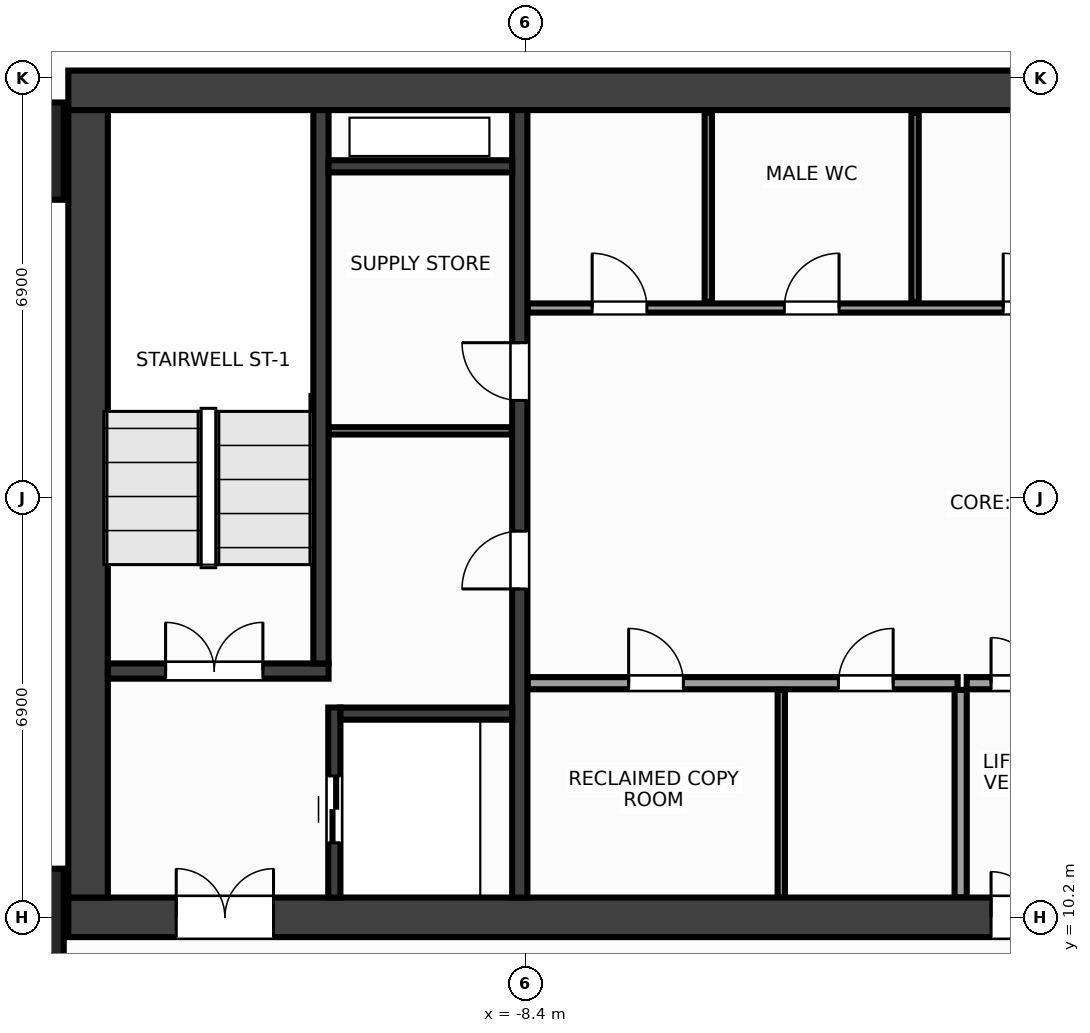
"""IFC4 building model, lengths in metres.
Left out: names, types, materials, properties, quantities, classifications, styles, units other than length and angle.
Written with IfcOpenShell. Run it as: python <this file> out.ifc"""

import sys

from ifc_helpers import new_model, si_unit, direction, frame, frame_2d, origin, origin_2d, place, context, subcontext, project, spatial, rectangle, extrude, source, transform, mapped, element, fill, save


model = new_model("IFC4")
c1 = context("Model", 3, precision=1e-05, world=origin(), true_north=direction((0.0, 1.0)))
c2 = subcontext(c1, "Body", "Model", "MODEL_VIEW")
j1 = project(units=[si_unit("LENGTHUNIT", "METRE"), si_unit("PLANEANGLEUNIT", "RADIAN")], contexts=[c1])
p1 = place(None, origin())
s1 = spatial("IfcSite", under=j1, at=p1, CompositionType="ELEMENT")
p2 = place(p1, origin())
s2 = spatial("IfcBuilding", under=s1, at=p2, CompositionType="ELEMENT")
p3 = place(p2, frame((0.0, 0.0, 117.2)))
s3 = spatial("IfcBuildingStorey", under=s2, at=p3, CompositionType="ELEMENT", Elevation=117.2)
m1 = source(origin(), c2, "Body", "SweptSolid", [
    extrude(rectangle(XDim=31.85, YDim=0.65, at=frame_2d((15.925, 0.0))), origin(), (0.0, 0.0, 1.0), 3.6),
])
p4 = place(p3, frame((-15.925, 23.8, 0.0), z_axis=(0.0, 0.0, 1.0), x_axis=(1.0, 0.0, 0.0)))
e1 = element("IfcWall", 1, at=p4, inside=s3, PredefinedType="SHEAR", context=c2, shape_type="MappedRepresentation", body=[
    mapped(m1, transform((0.0, 0.0, 0.0), x_axis=(1.0, 0.0, 0.0), y_axis=(0.0, 1.0, 0.0), z_axis=(0.0, 0.0, 1.0), scale=1.0)),
])
p5 = place(p3, frame((-15.925, 10.2, 0.0), z_axis=(0.0, 0.0, 1.0), x_axis=(1.0, 0.0, 0.0)))
e2 = element("IfcWall", 2, at=p5, inside=s3, PredefinedType="SHEAR", context=c2, shape_type="MappedRepresentation", body=[
    mapped(m1, transform((0.0, 0.0, 0.0), x_axis=(1.0, 0.0, 0.0), y_axis=(0.0, 1.0, 0.0), z_axis=(0.0, 0.0, 1.0), scale=1.0)),
])
p6 = place(p5, frame((1.775, 0.0, 0.0)))
e3 = element("IfcOpeningElement", 3, at=p6, cuts=e2, PredefinedType="OPENING", context=c2, shape_type="SweptSolid", body=[
    extrude(rectangle(XDim=1.6, YDim=2.15, at=frame_2d((0.8, 1.075))), frame((0.0, 0.337, 0.0), z_axis=(0.0, -1.0, 0.0), x_axis=(1.0, 0.0, 0.0)), (0.0, 0.0, 1.0), 0.674),
])
p7 = place(p5, frame((28.475, 0.0, 0.0)))
e4 = element("IfcOpeningElement", 4, at=p7, cuts=e2, PredefinedType="OPENING", context=c2, shape_type="SweptSolid", body=[
    extrude(rectangle(XDim=1.6, YDim=2.15, at=frame_2d((0.8, 1.075))), frame((0.0, 0.337, 0.0), z_axis=(0.0, -1.0, 0.0), x_axis=(1.0, 0.0, 0.0)), (0.0, 0.0, 1.0), 0.674),
])
p8 = place(p5, frame((15.175, 0.0, 0.0)))
e5 = element("IfcOpeningElement", 5, at=p8, cuts=e2, PredefinedType="OPENING", context=c2, shape_type="SweptSolid", body=[
    extrude(rectangle(XDim=1.5, YDim=2.2, at=frame_2d((0.75, 1.1))), frame((0.0, 0.337, 0.0), z_axis=(0.0, -1.0, 0.0), x_axis=(1.0, 0.0, 0.0)), (0.0, 0.0, 1.0), 0.674),
])
m2 = source(origin(), c2, "Body", "SweptSolid", [
    extrude(rectangle(XDim=12.95, YDim=0.65, at=frame_2d((6.475, 0.0))), origin(), (0.0, 0.0, 1.0), 3.6),
])
p9 = place(p3, frame((-15.6, 10.525, 0.0), z_axis=(0.0, 0.0, 1.0), x_axis=(0.0, 1.0, 0.0)))
e6 = element("IfcWall", 6, at=p9, inside=s3, PredefinedType="SHEAR", context=c2, shape_type="MappedRepresentation", body=[
    mapped(m2, transform((0.0, 0.0, 0.0), x_axis=(1.0, 0.0, 0.0), y_axis=(0.0, 1.0, 0.0), z_axis=(0.0, 0.0, 1.0), scale=1.0)),
])
m3 = source(origin(), c2, "Body", "SweptSolid", [
    extrude(rectangle(XDim=12.95, YDim=0.25, at=frame_2d((6.475, 0.0))), origin(), (0.0, 0.0, 1.0), 3.6),
])
p10 = place(p3, frame((-8.5, 10.525, 0.0), z_axis=(0.0, 0.0, 1.0), x_axis=(0.0, 1.0, 0.0)))
e7 = element("IfcWall", 7, at=p10, inside=s3, PredefinedType="SHEAR", context=c2, shape_type="MappedRepresentation", body=[
    mapped(m3, transform((0.0, 0.0, 0.0), x_axis=(1.0, 0.0, 0.0), y_axis=(0.0, 1.0, 0.0), z_axis=(0.0, 0.0, 1.0), scale=1.0)),
])
p11 = place(p10, frame((5.075, 0.0, 0.0)))
e8 = element("IfcOpeningElement", 8, at=p11, cuts=e7, PredefinedType="OPENING", context=c2, shape_type="SweptSolid", body=[
    extrude(rectangle(XDim=0.95, YDim=2.15, at=frame_2d((0.475, 1.075))), frame((0.0, 0.137, 0.0), z_axis=(0.0, -1.0, 0.0), x_axis=(1.0, 0.0, 0.0)), (0.0, 0.0, 1.0), 0.274),
])
p12 = place(p10, frame((8.175, 0.0, 0.0)))
e9 = element("IfcOpeningElement", 9, at=p12, cuts=e7, PredefinedType="OPENING", context=c2, shape_type="SweptSolid", body=[
    extrude(rectangle(XDim=0.95, YDim=2.15, at=frame_2d((0.475, 1.075))), frame((0.0, 0.137, 0.0), z_axis=(0.0, -1.0, 0.0), x_axis=(1.0, 0.0, 0.0)), (0.0, 0.0, 1.0), 0.274),
])
m4 = source(origin(), c2, "Body", "SweptSolid", [
    extrude(rectangle(XDim=3.63, YDim=0.25, at=frame_2d((1.815, 0.0))), origin(), (0.0, 0.0, 1.0), 3.6),
])
p13 = place(p3, frame((-15.275, 14.25, 0.0), z_axis=(0.0, 0.0, 1.0), x_axis=(1.0, 0.0, 0.0)))
e10 = element("IfcWall", 10, at=p13, inside=s3, PredefinedType="SHEAR", context=c2, shape_type="MappedRepresentation", body=[
    mapped(m4, transform((0.0, 0.0, 0.0), x_axis=(1.0, 0.0, 0.0), y_axis=(0.0, 1.0, 0.0), z_axis=(0.0, 0.0, 1.0), scale=1.0)),
])
p14 = place(p13, frame((0.95, 0.0, 0.0)))
e11 = element("IfcOpeningElement", 11, at=p14, cuts=e10, PredefinedType="OPENING", context=c2, shape_type="SweptSolid", body=[
    extrude(rectangle(XDim=1.6, YDim=2.15, at=frame_2d((0.8, 1.075))), frame((0.0, 0.137, 0.0), z_axis=(0.0, -1.0, 0.0), x_axis=(1.0, 0.0, 0.0)), (0.0, 0.0, 1.0), 0.274),
])
m5 = source(origin(), c2, "Body", "SweptSolid", [
    extrude(rectangle(XDim=9.1, YDim=0.25, at=frame_2d((4.55, 0.0))), origin(), (0.0, 0.0, 1.0), 3.6),
])
p15 = place(p3, frame((-11.77, 14.375, 0.0), z_axis=(0.0, 0.0, 1.0), x_axis=(0.0, 1.0, 0.0)))
e12 = element("IfcWall", 12, at=p15, inside=s3, PredefinedType="SHEAR", context=c2, shape_type="MappedRepresentation", body=[
    mapped(m5, transform((0.0, 0.0, 0.0), x_axis=(1.0, 0.0, 0.0), y_axis=(0.0, 1.0, 0.0), z_axis=(0.0, 0.0, 1.0), scale=1.0)),
])
m6 = source(origin(), c2, "Body", "SweptSolid", [
    extrude(rectangle(XDim=3.125, YDim=0.2, at=frame_2d((1.562, 0.0))), origin(), (0.0, 0.0, 1.0), 3.6),
])
p16 = place(p3, frame((-11.55, 10.525, 0.0), z_axis=(0.0, 0.0, 1.0), x_axis=(0.0, 1.0, 0.0)))
e13 = element("IfcWall", 13, at=p16, inside=s3, PredefinedType="SHEAR", context=c2, shape_type="MappedRepresentation", body=[
    mapped(m6, transform((0.0, 0.0, 0.0), x_axis=(1.0, 0.0, 0.0), y_axis=(0.0, 1.0, 0.0), z_axis=(0.0, 0.0, 1.0), scale=1.0)),
])
p17 = place(p16, frame((0.9, 0.0, 0.0)))
e14 = element("IfcOpeningElement", 14, at=p17, cuts=e13, PredefinedType="OPENING", context=c2, shape_type="SweptSolid", body=[
    extrude(rectangle(XDim=1.1, YDim=2.15, at=frame_2d((0.55, 1.075))), frame((0.0, 0.112, 0.0), z_axis=(0.0, -1.0, 0.0), x_axis=(1.0, 0.0, 0.0)), (0.0, 0.0, 1.0), 0.224),
])
m7 = source(origin(), c2, "Body", "SweptSolid", [
    extrude(rectangle(XDim=2.825, YDim=0.2, at=frame_2d((1.413, 0.0))), origin(), (0.0, 0.0, 1.0), 3.6),
])
p18 = place(p3, frame((-11.45, 13.55, 0.0), z_axis=(0.0, 0.0, 1.0), x_axis=(1.0, 0.0, 0.0)))
e15 = element("IfcWall", 15, at=p18, inside=s3, PredefinedType="SHEAR", context=c2, shape_type="MappedRepresentation", body=[
    mapped(m7, transform((0.0, 0.0, 0.0), x_axis=(1.0, 0.0, 0.0), y_axis=(0.0, 1.0, 0.0), z_axis=(0.0, 0.0, 1.0), scale=1.0)),
])
m8 = source(origin(), c2, "Body", "SweptSolid", [
    extrude(rectangle(XDim=3.02, YDim=0.2, at=frame_2d((1.51, 0.0))), origin(), (0.0, 0.0, 1.0), 3.6),
])
p19 = place(p3, frame((-11.645, 22.55, 0.0), z_axis=(0.0, 0.0, 1.0), x_axis=(1.0, 0.0, 0.0)))
e16 = element("IfcWall", 16, at=p19, inside=s3, PredefinedType="SHEAR", context=c2, shape_type="MappedRepresentation", body=[
    mapped(m8, transform((0.0, 0.0, 0.0), x_axis=(1.0, 0.0, 0.0), y_axis=(0.0, 1.0, 0.0), z_axis=(0.0, 0.0, 1.0), scale=1.0)),
])
m9 = source(origin(), c2, "Body", "SweptSolid", [
    extrude(rectangle(XDim=1.6, YDim=1.6, at=origin_2d()), origin(), (0.0, 0.0, 1.0), 3.6),
])
for number, where, z_axis, x_axis in (
    (17, (-16.8, 10.2, 0.0), (0.0, 0.0, 1.0), (1.0, 0.0, 0.0)),
    (18, (-16.8, 22.8, 0.0), (0.0, 0.0, 1.0), (1.0, 0.0, 0.0)),
):
    element("IfcColumn", number, at=place(p3, frame(where, z_axis=z_axis, x_axis=x_axis)), inside=s3, PredefinedType="COLUMN", context=c2, shape_type="MappedRepresentation", body=[
        mapped(m9, transform((0.0, 0.0, 0.0), x_axis=(1.0, 0.0, 0.0), y_axis=(0.0, 1.0, 0.0), z_axis=(0.0, 0.0, 1.0), scale=1.0)),
    ])
m10 = source(origin(), c2, "Body", "SweptSolid", [
    extrude(rectangle(XDim=3.01, YDim=0.12, at=frame_2d((1.505, 0.0))), origin(), (0.0, 0.0, 1.0), 3.36),
])
p20 = place(p3, frame((-11.64, 18.2, 0.0), z_axis=(0.0, 0.0, 1.0), x_axis=(1.0, 0.0, 0.0)))
e19 = element("IfcWall", 19, at=p20, inside=s3, PredefinedType="PARTITIONING", context=c2, shape_type="MappedRepresentation", body=[
    mapped(m10, transform((0.0, 0.0, 0.0), x_axis=(1.0, 0.0, 0.0), y_axis=(0.0, 1.0, 0.0), z_axis=(0.0, 0.0, 1.0), scale=1.0)),
])
m11 = source(origin(), c2, "Body", "SweptSolid", [
    extrude(rectangle(XDim=7.07, YDim=0.2, at=frame_2d((3.535, 0.0))), origin(), (0.0, 0.0, 1.0), 3.36),
])
p21 = place(p3, frame((-8.37, 14.05, 0.0), z_axis=(0.0, 0.0, 1.0), x_axis=(1.0, 0.0, 0.0)))
e20 = element("IfcWall", 20, at=p21, inside=s3, PredefinedType="PARTITIONING", context=c2, shape_type="MappedRepresentation", body=[
    mapped(m11, transform((0.0, 0.0, 0.0), x_axis=(1.0, 0.0, 0.0), y_axis=(0.0, 1.0, 0.0), z_axis=(0.0, 0.0, 1.0), scale=1.0)),
])
p22 = place(p21, frame((1.66, 0.0, 0.0)))
e21 = element("IfcOpeningElement", 21, at=p22, cuts=e20, PredefinedType="OPENING", context=c2, shape_type="SweptSolid", body=[
    extrude(rectangle(XDim=0.9, YDim=2.15, at=frame_2d((0.45, 1.075))), frame((0.0, 0.112, 0.0), z_axis=(0.0, -1.0, 0.0), x_axis=(1.0, 0.0, 0.0)), (0.0, 0.0, 1.0), 0.224),
])
p23 = place(p21, frame((5.11, 0.0, 0.0)))
e22 = element("IfcOpeningElement", 22, at=p23, cuts=e20, PredefinedType="OPENING", context=c2, shape_type="SweptSolid", body=[
    extrude(rectangle(XDim=0.9, YDim=2.15, at=frame_2d((0.45, 1.075))), frame((0.0, 0.112, 0.0), z_axis=(0.0, -1.0, 0.0), x_axis=(1.0, 0.0, 0.0)), (0.0, 0.0, 1.0), 0.224),
])
m12 = source(origin(), c2, "Body", "SweptSolid", [
    extrude(rectangle(XDim=3.415, YDim=0.2, at=frame_2d((1.708, 0.0))), origin(), (0.0, 0.0, 1.0), 3.36),
])
p24 = place(p3, frame((-1.25, 10.525, 0.0), z_axis=(0.0, 0.0, 1.0), x_axis=(0.0, 1.0, 0.0)))
e23 = element("IfcWall", 23, at=p24, inside=s3, PredefinedType="PARTITIONING", context=c2, shape_type="MappedRepresentation", body=[
    mapped(m12, transform((0.0, 0.0, 0.0), x_axis=(1.0, 0.0, 0.0), y_axis=(0.0, 1.0, 0.0), z_axis=(0.0, 0.0, 1.0), scale=1.0)),
])
m13 = source(origin(), c2, "Body", "SweptSolid", [
    extrude(rectangle(XDim=2.3, YDim=0.2, at=frame_2d((1.15, 0.0))), origin(), (0.0, 0.0, 1.0), 3.36),
])
p25 = place(p3, frame((-1.15, 14.05, 0.0), z_axis=(0.0, 0.0, 1.0), x_axis=(1.0, 0.0, 0.0)))
e24 = element("IfcWall", 24, at=p25, inside=s3, PredefinedType="PARTITIONING", context=c2, shape_type="MappedRepresentation", body=[
    mapped(m13, transform((0.0, 0.0, 0.0), x_axis=(1.0, 0.0, 0.0), y_axis=(0.0, 1.0, 0.0), z_axis=(0.0, 0.0, 1.0), scale=1.0)),
])
p26 = place(p25, frame((0.4, 0.0, 0.0)))
e25 = element("IfcOpeningElement", 25, at=p26, cuts=e24, PredefinedType="OPENING", context=c2, shape_type="SweptSolid", body=[
    extrude(rectangle(XDim=1.5, YDim=2.2, at=frame_2d((0.75, 1.1))), frame((0.0, 0.112, 0.0), z_axis=(0.0, -1.0, 0.0), x_axis=(1.0, 0.0, 0.0)), (0.0, 0.0, 1.0), 0.224),
])
m14 = source(origin(), c2, "Body", "SweptSolid", [
    extrude(rectangle(XDim=14.59, YDim=0.15, at=frame_2d((7.295, 0.0))), origin(), (0.0, 0.0, 1.0), 3.36),
])
p27 = place(p3, frame((-8.37, 20.22, 0.0), z_axis=(0.0, 0.0, 1.0), x_axis=(1.0, 0.0, 0.0)))
e26 = element("IfcWall", 26, at=p27, inside=s3, PredefinedType="PARTITIONING", context=c2, shape_type="MappedRepresentation", body=[
    mapped(m14, transform((0.0, 0.0, 0.0), x_axis=(1.0, 0.0, 0.0), y_axis=(0.0, 1.0, 0.0), z_axis=(0.0, 0.0, 1.0), scale=1.0)),
])
p28 = place(p27, frame((1.06, 0.0, 0.0)))
e27 = element("IfcOpeningElement", 27, at=p28, cuts=e26, PredefinedType="OPENING", context=c2, shape_type="SweptSolid", body=[
    extrude(rectangle(XDim=0.9, YDim=2.15, at=frame_2d((0.45, 1.075))), frame((0.0, 0.087, 0.0), z_axis=(0.0, -1.0, 0.0), x_axis=(1.0, 0.0, 0.0)), (0.0, 0.0, 1.0), 0.174),
])
p29 = place(p27, frame((4.22, 0.0, 0.0)))
e28 = element("IfcOpeningElement", 28, at=p29, cuts=e26, PredefinedType="OPENING", context=c2, shape_type="SweptSolid", body=[
    extrude(rectangle(XDim=0.9, YDim=2.15, at=frame_2d((0.45, 1.075))), frame((0.0, 0.087, 0.0), z_axis=(0.0, -1.0, 0.0), x_axis=(1.0, 0.0, 0.0)), (0.0, 0.0, 1.0), 0.174),
])
p30 = place(p27, frame((7.82, 0.0, 0.0)))
e29 = element("IfcOpeningElement", 29, at=p30, cuts=e26, PredefinedType="OPENING", context=c2, shape_type="SweptSolid", body=[
    extrude(rectangle(XDim=0.9, YDim=2.15, at=frame_2d((0.45, 1.075))), frame((0.0, 0.087, 0.0), z_axis=(0.0, -1.0, 0.0), x_axis=(1.0, 0.0, 0.0)), (0.0, 0.0, 1.0), 0.174),
])
p31 = place(p27, frame((11.87, 0.0, 0.0)))
e30 = element("IfcOpeningElement", 30, at=p31, cuts=e26, PredefinedType="OPENING", context=c2, shape_type="SweptSolid", body=[
    extrude(rectangle(XDim=0.9, YDim=2.15, at=frame_2d((0.45, 1.075))), frame((0.0, 0.087, 0.0), z_axis=(0.0, -1.0, 0.0), x_axis=(1.0, 0.0, 0.0)), (0.0, 0.0, 1.0), 0.174),
])
m15 = source(origin(), c2, "Body", "SweptSolid", [
    extrude(rectangle(XDim=3.415, YDim=0.12, at=frame_2d((1.708, 0.0))), origin(), (0.0, 0.0, 1.0), 3.36),
])
p32 = place(p3, frame((-4.2, 10.525, 0.0), z_axis=(0.0, 0.0, 1.0), x_axis=(0.0, 1.0, 0.0)))
e31 = element("IfcWall", 31, at=p32, inside=s3, PredefinedType="PARTITIONING", context=c2, shape_type="MappedRepresentation", body=[
    mapped(m15, transform((0.0, 0.0, 0.0), x_axis=(1.0, 0.0, 0.0), y_axis=(0.0, 1.0, 0.0), z_axis=(0.0, 0.0, 1.0), scale=1.0)),
])
m16 = source(origin(), c2, "Body", "SweptSolid", [
    extrude(rectangle(XDim=3.115, YDim=0.12, at=frame_2d((1.558, 0.0))), origin(), (0.0, 0.0, 1.0), 3.36),
])
for number, where, z_axis, x_axis in (
    (32, (-5.4, 20.32, 0.0), (0.0, 0.0, 1.0), (0.0, 1.0, 0.0)),
    (33, (-2.0, 20.32, 0.0), (0.0, 0.0, 1.0), (0.0, 1.0, 0.0)),
):
    element("IfcWall", number, at=place(p3, frame(where, z_axis=z_axis, x_axis=x_axis)), inside=s3, PredefinedType="PARTITIONING", context=c2, shape_type="MappedRepresentation", body=[
        mapped(m16, transform((0.0, 0.0, 0.0), x_axis=(1.0, 0.0, 0.0), y_axis=(0.0, 1.0, 0.0), z_axis=(0.0, 0.0, 1.0), scale=1.0)),
    ])
m17 = source(origin(), c2, "Body", "SweptSolid", [
    extrude(rectangle(XDim=1.6, YDim=2.15, at=frame_2d((0.8, 1.075))), frame((0.0, 0.025, 0.0), z_axis=(0.0, -1.0, 0.0), x_axis=(1.0, 0.0, 0.0)), (0.0, 0.0, 1.0), 0.05),
])
p33 = place(p14, origin())
e34 = element("IfcDoor", 34, at=p33, inside=s3, OperationType="DOUBLE_DOOR_SINGLE_SWING", PredefinedType="DOOR", context=c2, shape_type="MappedRepresentation", body=[
    mapped(m17, transform((0.0, 0.0, 0.0), x_axis=(1.0, 0.0, 0.0), y_axis=(0.0, 1.0, 0.0), z_axis=(0.0, 0.0, 1.0), scale=1.0)),
])
fill(e11, e34)
p34 = place(p6, origin())
e35 = element("IfcDoor", 35, at=p34, inside=s3, OperationType="DOUBLE_DOOR_SINGLE_SWING", PredefinedType="DOOR", context=c2, shape_type="MappedRepresentation", body=[
    mapped(m17, transform((0.0, 0.0, 0.0), x_axis=(1.0, 0.0, 0.0), y_axis=(0.0, 1.0, 0.0), z_axis=(0.0, 0.0, 1.0), scale=1.0)),
])
fill(e3, e35)
m18 = source(origin(), c2, "Body", "SweptSolid", [
    extrude(rectangle(XDim=1.1, YDim=2.15, at=frame_2d((0.55, 1.075))), frame((0.0, 0.025, 0.0), z_axis=(0.0, -1.0, 0.0), x_axis=(1.0, 0.0, 0.0)), (0.0, 0.0, 1.0), 0.05),
])
p35 = place(p17, origin())
e36 = element("IfcDoor", 36, at=p35, inside=s3, OperationType="DOUBLE_DOOR_SLIDING", PredefinedType="DOOR", context=c2, shape_type="MappedRepresentation", body=[
    mapped(m18, transform((0.0, 0.0, 0.0), x_axis=(1.0, 0.0, 0.0), y_axis=(0.0, 1.0, 0.0), z_axis=(0.0, 0.0, 1.0), scale=1.0)),
])
fill(e14, e36)
m19 = source(origin(), c2, "Body", "SweptSolid", [
    extrude(rectangle(XDim=0.95, YDim=2.15, at=frame_2d((0.475, 1.075))), frame((0.0, 0.025, 0.0), z_axis=(0.0, -1.0, 0.0), x_axis=(1.0, 0.0, 0.0)), (0.0, 0.0, 1.0), 0.05),
])
p36 = place(p11, origin())
e37 = element("IfcDoor", 37, at=p36, inside=s3, OperationType="SINGLE_SWING_LEFT", PredefinedType="DOOR", context=c2, shape_type="MappedRepresentation", body=[
    mapped(m19, transform((0.0, 0.0, 0.0), x_axis=(1.0, 0.0, 0.0), y_axis=(0.0, 1.0, 0.0), z_axis=(0.0, 0.0, 1.0), scale=1.0)),
])
fill(e8, e37)
p37 = place(p12, origin())
e38 = element("IfcDoor", 38, at=p37, inside=s3, OperationType="SINGLE_SWING_RIGHT", PredefinedType="DOOR", context=c2, shape_type="MappedRepresentation", body=[
    mapped(m19, transform((0.0, 0.0, 0.0), x_axis=(1.0, 0.0, 0.0), y_axis=(0.0, 1.0, 0.0), z_axis=(0.0, 0.0, 1.0), scale=1.0)),
])
fill(e9, e38)
m20 = source(origin(), c2, "Body", "SweptSolid", [
    extrude(rectangle(XDim=0.9, YDim=2.15, at=frame_2d((0.45, 1.075))), frame((0.0, 0.025, 0.0), z_axis=(0.0, -1.0, 0.0), x_axis=(1.0, 0.0, 0.0)), (0.0, 0.0, 1.0), 0.05),
])
p38 = place(p22, origin())
e39 = element("IfcDoor", 39, at=p38, inside=s3, OperationType="SINGLE_SWING_LEFT", PredefinedType="DOOR", context=c2, shape_type="MappedRepresentation", body=[
    mapped(m20, transform((0.0, 0.0, 0.0), x_axis=(1.0, 0.0, 0.0), y_axis=(0.0, 1.0, 0.0), z_axis=(0.0, 0.0, 1.0), scale=1.0)),
])
fill(e21, e39)
p39 = place(p23, origin())
e40 = element("IfcDoor", 40, at=p39, inside=s3, OperationType="SINGLE_SWING_RIGHT", PredefinedType="DOOR", context=c2, shape_type="MappedRepresentation", body=[
    mapped(m20, transform((0.0, 0.0, 0.0), x_axis=(1.0, 0.0, 0.0), y_axis=(0.0, 1.0, 0.0), z_axis=(0.0, 0.0, 1.0), scale=1.0)),
])
fill(e22, e40)
m21 = source(origin(), c2, "Body", "SweptSolid", [
    extrude(rectangle(XDim=1.5, YDim=2.2, at=frame_2d((0.75, 1.1))), frame((0.0, 0.025, 0.0), z_axis=(0.0, -1.0, 0.0), x_axis=(1.0, 0.0, 0.0)), (0.0, 0.0, 1.0), 0.05),
])
p40 = place(p26, origin())
e41 = element("IfcDoor", 41, at=p40, inside=s3, OperationType="DOUBLE_DOOR_SINGLE_SWING", PredefinedType="DOOR", context=c2, shape_type="MappedRepresentation", body=[
    mapped(m21, transform((0.0, 0.0, 0.0), x_axis=(1.0, 0.0, 0.0), y_axis=(0.0, 1.0, 0.0), z_axis=(0.0, 0.0, 1.0), scale=1.0)),
])
fill(e25, e41)
p41 = place(p8, origin())
e42 = element("IfcDoor", 42, at=p41, inside=s3, OperationType="DOUBLE_DOOR_SINGLE_SWING", PredefinedType="DOOR", context=c2, shape_type="MappedRepresentation", body=[
    mapped(m21, transform((0.0, 0.0, 0.0), x_axis=(1.0, 0.0, 0.0), y_axis=(0.0, 1.0, 0.0), z_axis=(0.0, 0.0, 1.0), scale=1.0)),
])
fill(e5, e42)
p42 = place(p28, origin())
e43 = element("IfcDoor", 43, at=p42, inside=s3, OperationType="SINGLE_SWING_LEFT", PredefinedType="DOOR", context=c2, shape_type="MappedRepresentation", body=[
    mapped(m20, transform((0.0, 0.0, 0.0), x_axis=(1.0, 0.0, 0.0), y_axis=(0.0, 1.0, 0.0), z_axis=(0.0, 0.0, 1.0), scale=1.0)),
])
fill(e27, e43)
p43 = place(p29, origin())
e44 = element("IfcDoor", 44, at=p43, inside=s3, OperationType="SINGLE_SWING_RIGHT", PredefinedType="DOOR", context=c2, shape_type="MappedRepresentation", body=[
    mapped(m20, transform((0.0, 0.0, 0.0), x_axis=(1.0, 0.0, 0.0), y_axis=(0.0, 1.0, 0.0), z_axis=(0.0, 0.0, 1.0), scale=1.0)),
])
fill(e28, e44)
p44 = place(p30, origin())
e45 = element("IfcDoor", 45, at=p44, inside=s3, OperationType="SINGLE_SWING_LEFT", PredefinedType="DOOR", context=c2, shape_type="MappedRepresentation", body=[
    mapped(m20, transform((0.0, 0.0, 0.0), x_axis=(1.0, 0.0, 0.0), y_axis=(0.0, 1.0, 0.0), z_axis=(0.0, 0.0, 1.0), scale=1.0)),
])
fill(e29, e45)
save(model, sys.argv[1])
